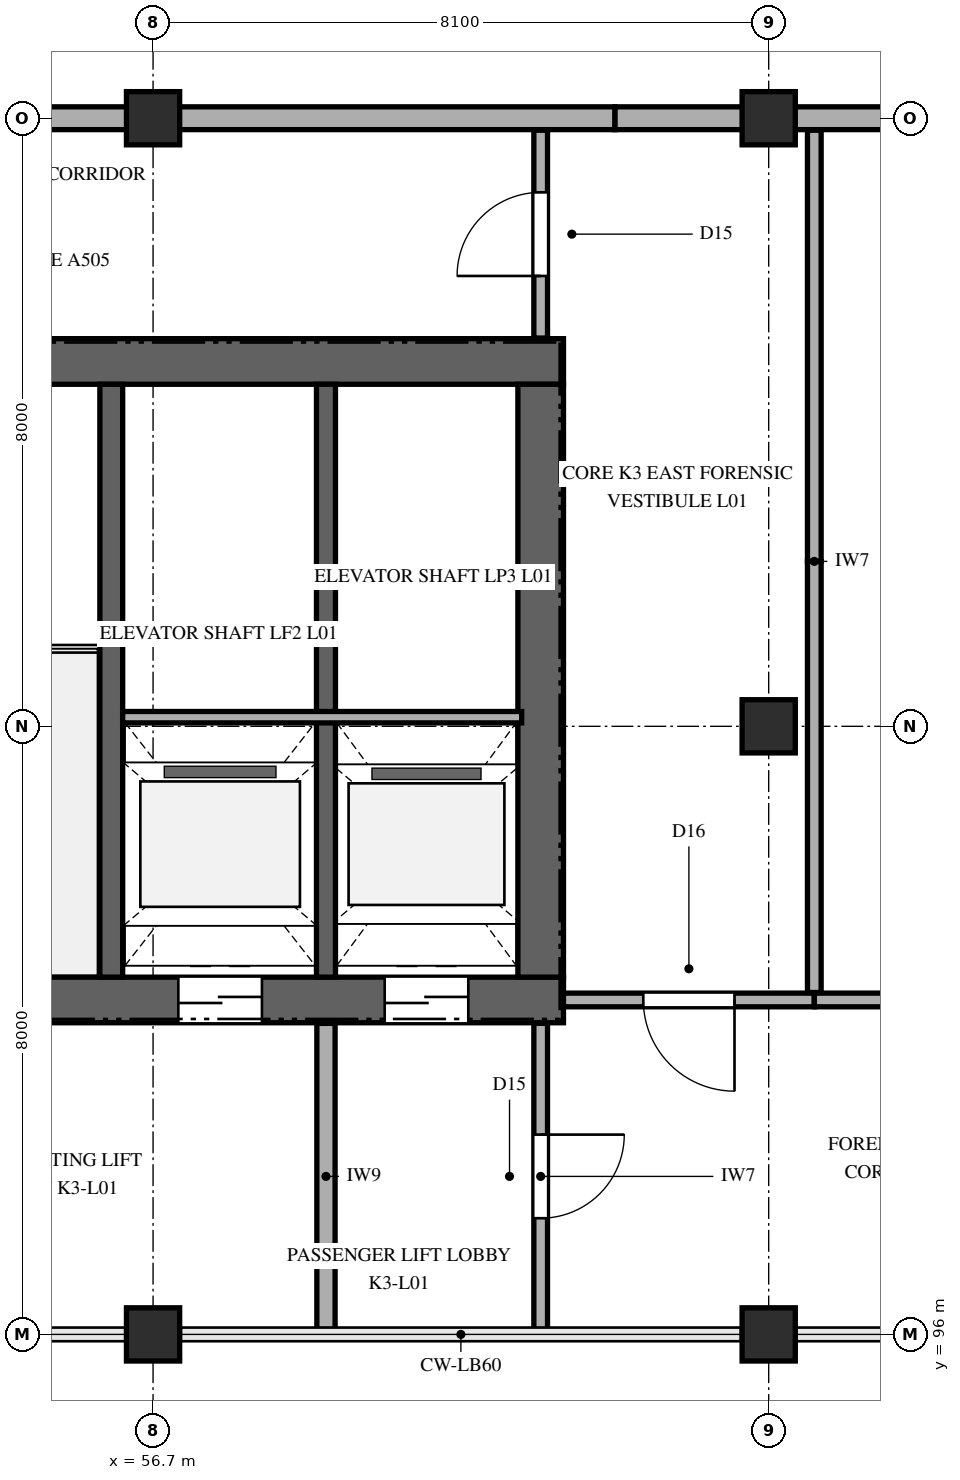
"""IFC4 building model, lengths in metres.
Left out: names, types, materials, properties, quantities, classifications, styles, units other than length and angle.
Written with IfcOpenShell. Run it as: python <this file> out.ifc"""

import sys

from ifc_helpers import new_model, si_unit, direction, frame, frame_2d, origin, origin_2d, place, context, subcontext, project, spatial, rectangle, extrude, element, fill, save


model = new_model("IFC4")
c1 = context("Model", 3, precision=1e-05, world=origin(), true_north=direction((0.0, 1.0)))
c2 = subcontext(c1, "Body", "Model", "MODEL_VIEW")
j1 = project(units=[si_unit("LENGTHUNIT", "METRE"), si_unit("PLANEANGLEUNIT", "RADIAN")], contexts=[c1])
p1 = place(None, origin())
s1 = spatial("IfcSite", under=j1, at=p1, CompositionType="ELEMENT")
p2 = place(p1, origin())
s2 = spatial("IfcBuilding", under=s1, at=p2, CompositionType="ELEMENT")
p3 = place(p2, frame((0.0, 0.0, 5.4)))
s3 = spatial("IfcBuildingStorey", under=s2, at=p3, CompositionType="ELEMENT", Elevation=5.4)
p4 = place(p3, frame((46.7, 100.4, 0.0), z_axis=(0.0, 0.0, 1.0), x_axis=(1.0, 0.0, 0.0)))
e1 = element("IfcWall", 1, at=p4, inside=s3, PredefinedType="SHEAR", context=c2, shape_type="SweptSolid", body=[
    extrude(rectangle(XDim=15.4, YDim=0.6, at=frame_2d((7.7, 0.0))), origin(), (0.0, 0.0, 1.0), 4.8),
])
p5 = place(p4, frame((1.05, 0.0, 0.0)))
e2 = element("IfcOpeningElement", 2, at=p5, cuts=e1, PredefinedType="OPENING", context=c2, shape_type="SweptSolid", body=[
    extrude(rectangle(XDim=1.15, YDim=2.25, at=frame_2d((0.575, 1.125))), frame((0.0, 0.31, 0.0), z_axis=(0.0, -1.0, 0.0), x_axis=(1.0, 0.0, 0.0)), (0.0, 0.0, 1.0), 0.62),
])
p6 = place(p4, frame((10.333, 0.0, 0.0)))
e3 = element("IfcOpeningElement", 3, at=p6, cuts=e1, PredefinedType="OPENING", context=c2, shape_type="SweptSolid", body=[
    extrude(rectangle(XDim=1.1, YDim=2.2, at=frame_2d((0.55, 1.1))), frame((0.0, 0.31, 0.0), z_axis=(0.0, -1.0, 0.0), x_axis=(1.0, 0.0, 0.0)), (0.0, 0.0, 1.0), 0.62),
])
p7 = place(p4, frame((13.048, 0.0, 0.0)))
e4 = element("IfcOpeningElement", 4, at=p7, cuts=e1, PredefinedType="OPENING", context=c2, shape_type="SweptSolid", body=[
    extrude(rectangle(XDim=1.1, YDim=2.2, at=frame_2d((0.55, 1.1))), frame((0.0, 0.31, 0.0), z_axis=(0.0, -1.0, 0.0), x_axis=(1.0, 0.0, 0.0)), (0.0, 0.0, 1.0), 0.62),
])
p8 = place(p3, frame((46.7, 108.8, 0.0), z_axis=(0.0, 0.0, 1.0), x_axis=(1.0, 0.0, 0.0)))
e5 = element("IfcWall", 5, at=p8, inside=s3, PredefinedType="SHEAR", context=c2, shape_type="SweptSolid", body=[
    extrude(rectangle(XDim=15.4, YDim=0.6, at=frame_2d((7.7, 0.0))), origin(), (0.0, 0.0, 1.0), 4.8),
])
p9 = place(p3, frame((61.8, 100.7, 0.0), z_axis=(0.0, 0.0, 1.0), x_axis=(0.0, 1.0, 0.0)))
e6 = element("IfcWall", 6, at=p9, inside=s3, PredefinedType="SHEAR", context=c2, shape_type="SweptSolid", body=[
    extrude(rectangle(XDim=7.8, YDim=0.6, at=frame_2d((3.9, 0.0))), origin(), (0.0, 0.0, 1.0), 4.8),
])
p10 = place(p3, frame((56.15, 100.7, 0.0), z_axis=(0.0, 0.0, 1.0), x_axis=(0.0, 1.0, 0.0)))
e7 = element("IfcWall", 7, at=p10, inside=s3, PredefinedType="SHEAR", context=c2, shape_type="SweptSolid", body=[
    extrude(rectangle(XDim=7.8, YDim=0.3, at=frame_2d((3.9, 0.0))), origin(), (0.0, 0.0, 1.0), 4.8),
])
p11 = place(p3, frame((58.975, 100.7, 0.0), z_axis=(0.0, 0.0, 1.0), x_axis=(0.0, 1.0, 0.0)))
e8 = element("IfcWall", 8, at=p11, inside=s3, PredefinedType="SHEAR", context=c2, shape_type="SweptSolid", body=[
    extrude(rectangle(XDim=7.8, YDim=0.25, at=frame_2d((3.9, 0.0))), origin(), (0.0, 0.0, 1.0), 4.8),
])
for number, where, z_axis, x_axis in (
    (9, (56.7, 96.0, 0.0), (0.0, 0.0, 1.0), (1.0, 0.0, 0.0)),
    (10, (56.7, 112.0, 0.0), (0.0, 0.0, 1.0), (1.0, 0.0, 0.0)),
    (11, (64.8, 96.0, 0.0), (0.0, 0.0, 1.0), (1.0, 0.0, 0.0)),
    (12, (64.8, 104.0, 0.0), (0.0, 0.0, 1.0), (1.0, 0.0, 0.0)),
    (13, (64.8, 112.0, 0.0), (0.0, 0.0, 1.0), (1.0, 0.0, 0.0)),
):
    element("IfcColumn", number, at=place(p3, frame(where, z_axis=z_axis, x_axis=x_axis)), inside=s3, PredefinedType="COLUMN", context=c2, shape_type="SweptSolid", body=[
        extrude(rectangle(XDim=0.7, YDim=0.7, at=origin_2d()), origin(), (0.0, 0.0, 1.0), 4.8),
    ])
p12 = place(p3, frame((76.95, 112.0, 0.0), z_axis=(0.0, 0.0, 1.0), x_axis=(-1.0, 0.0, 0.0)))
e14 = element("IfcWall", 14, at=p12, inside=s3, PredefinedType="SOLIDWALL", context=c2, shape_type="SweptSolid", body=[
    extrude(rectangle(XDim=14.175, YDim=0.3, at=frame_2d((7.087, 0.0))), origin(), (0.0, 0.0, 1.0), 3.812),
])
p13 = place(p12, frame((5.4, 0.0, 0.95)))
e15 = element("IfcOpeningElement", 15, at=p13, cuts=e14, PredefinedType="OPENING", context=c2, shape_type="SweptSolid", body=[
    extrude(rectangle(XDim=3.6, YDim=0.9, at=frame_2d((1.8, 0.45))), frame((0.0, 0.16, 0.0), z_axis=(0.0, -1.0, 0.0), x_axis=(1.0, 0.0, 0.0)), (0.0, 0.0, 1.0), 0.32),
])
p14 = place(p3, frame((62.775, 112.0, 0.0), z_axis=(0.0, 0.0, 1.0), x_axis=(-1.0, 0.0, 0.0)))
e16 = element("IfcWall", 16, at=p14, inside=s3, PredefinedType="SOLIDWALL", context=c2, shape_type="SweptSolid", body=[
    extrude(rectangle(XDim=14.175, YDim=0.3, at=frame_2d((7.087, 0.0))), origin(), (0.0, 0.0, 1.0), 3.812),
])
p15 = place(p14, frame((8.55, 0.0, 0.95)))
e17 = element("IfcOpeningElement", 17, at=p15, cuts=e16, PredefinedType="OPENING", context=c2, shape_type="SweptSolid", body=[
    extrude(rectangle(XDim=1.6, YDim=1.4, at=frame_2d((0.8, 0.7))), frame((0.0, 0.16, 0.0), z_axis=(0.0, -1.0, 0.0), x_axis=(1.0, 0.0, 0.0)), (0.0, 0.0, 1.0), 0.32),
])
p16 = place(p3, frame((56.3, 104.12, 0.0), z_axis=(0.0, 0.0, 1.0), x_axis=(1.0, 0.0, 0.0)))
e18 = element("IfcWall", 18, at=p16, inside=s3, PredefinedType="PARTITIONING", context=c2, shape_type="SweptSolid", body=[
    extrude(rectangle(XDim=5.25, YDim=0.15, at=frame_2d((2.625, 0.0))), origin(), (0.0, 0.0, 1.0), 4.52),
])
p17 = place(p3, frame((62.1, 100.4, 0.0), z_axis=(0.0, 0.0, 1.0), x_axis=(1.0, 0.0, 0.0)))
e19 = element("IfcWall", 19, at=p17, inside=s3, PredefinedType="PARTITIONING", context=c2, shape_type="SweptSolid", body=[
    extrude(rectangle(XDim=3.3, YDim=0.18, at=frame_2d((1.65, 0.0))), origin(), (0.0, 0.0, 1.0), 4.52),
])
p18 = place(p17, frame((1.05, 0.0, 0.0)))
e20 = element("IfcOpeningElement", 20, at=p18, cuts=e19, PredefinedType="OPENING", context=c2, shape_type="SweptSolid", body=[
    extrude(rectangle(XDim=1.2, YDim=2.2, at=frame_2d((0.6, 1.1))), frame((0.0, 0.1, 0.0), z_axis=(0.0, -1.0, 0.0), x_axis=(1.0, 0.0, 0.0)), (0.0, 0.0, 1.0), 0.2),
])
p19 = place(p3, frame((65.4, 100.4, 0.0), z_axis=(0.0, 0.0, 1.0), x_axis=(1.0, 0.0, 0.0)))
e21 = element("IfcWall", 21, at=p19, inside=s3, PredefinedType="PARTITIONING", context=c2, shape_type="SweptSolid", body=[
    extrude(rectangle(XDim=19.1, YDim=0.18, at=frame_2d((9.55, 0.0))), origin(), (0.0, 0.0, 1.0), 4.52),
])
p20 = place(p19, frame((9.0, 0.0, 0.0)))
e22 = element("IfcOpeningElement", 22, at=p20, cuts=e21, PredefinedType="OPENING", context=c2, shape_type="SweptSolid", body=[
    extrude(rectangle(XDim=1.1, YDim=2.3, at=frame_2d((0.55, 1.15))), frame((0.0, 0.1, 0.0), z_axis=(0.0, -1.0, 0.0), x_axis=(1.0, 0.0, 0.0)), (0.0, 0.0, 1.0), 0.2),
])
p21 = place(p3, frame((58.975, 96.065, 0.0), z_axis=(0.0, 0.0, 1.0), x_axis=(0.0, 1.0, 0.0)))
e23 = element("IfcWall", 23, at=p21, inside=s3, PredefinedType="PARTITIONING", context=c2, shape_type="SweptSolid", body=[
    extrude(rectangle(XDim=4.027, YDim=0.24, at=frame_2d((2.014, 0.0))), origin(), (0.0, 0.0, 1.0), 4.52),
])
p22 = place(p3, frame((61.8, 96.065, 0.0), z_axis=(0.0, 0.0, 1.0), x_axis=(0.0, 1.0, 0.0)))
e24 = element("IfcWall", 24, at=p22, inside=s3, PredefinedType="PARTITIONING", context=c2, shape_type="SweptSolid", body=[
    extrude(rectangle(XDim=4.027, YDim=0.18, at=frame_2d((2.014, 0.0))), origin(), (0.0, 0.0, 1.0), 4.52),
])
p23 = place(p22, frame((1.463, 0.0, 0.0)))
e25 = element("IfcOpeningElement", 25, at=p23, cuts=e24, PredefinedType="OPENING", context=c2, shape_type="SweptSolid", body=[
    extrude(rectangle(XDim=1.1, YDim=2.2, at=frame_2d((0.55, 1.1))), frame((0.0, 0.1, 0.0), z_axis=(0.0, -1.0, 0.0), x_axis=(1.0, 0.0, 0.0)), (0.0, 0.0, 1.0), 0.2),
])
p24 = place(p3, frame((61.8, 109.108, 0.0), z_axis=(0.0, 0.0, 1.0), x_axis=(0.0, 1.0, 0.0)))
e26 = element("IfcWall", 26, at=p24, inside=s3, PredefinedType="PARTITIONING", context=c2, shape_type="SweptSolid", body=[
    extrude(rectangle(XDim=2.734, YDim=0.18, at=frame_2d((1.367, 0.0))), origin(), (0.0, 0.0, 1.0), 4.52),
])
p25 = place(p24, frame((0.817, 0.0, 0.0)))
e27 = element("IfcOpeningElement", 27, at=p25, cuts=e26, PredefinedType="OPENING", context=c2, shape_type="SweptSolid", body=[
    extrude(rectangle(XDim=1.1, YDim=2.2, at=frame_2d((0.55, 1.1))), frame((0.0, 0.1, 0.0), z_axis=(0.0, -1.0, 0.0), x_axis=(1.0, 0.0, 0.0)), (0.0, 0.0, 1.0), 0.2),
])
p26 = place(p3, frame((65.4, 100.498, 0.0), z_axis=(0.0, 0.0, 1.0), x_axis=(0.0, 1.0, 0.0)))
e28 = element("IfcWall", 28, at=p26, inside=s3, PredefinedType="PARTITIONING", context=c2, shape_type="SweptSolid", body=[
    extrude(rectangle(XDim=5.672, YDim=0.18, at=frame_2d((2.836, 0.0))), origin(), (0.0, 0.0, 1.0), 4.52),
])
p27 = place(p3, frame((65.4, 106.17, 0.0), z_axis=(0.0, 0.0, 1.0), x_axis=(0.0, 1.0, 0.0)))
e29 = element("IfcWall", 29, at=p27, inside=s3, PredefinedType="PARTITIONING", context=c2, shape_type="SweptSolid", body=[
    extrude(rectangle(XDim=5.672, YDim=0.18, at=frame_2d((2.836, 0.0))), origin(), (0.0, 0.0, 1.0), 4.52),
])
p28 = place(p6, frame((1.1, 0.0, 0.0), z_axis=(0.0, 0.0, 1.0), x_axis=(-1.0, 0.0, 0.0)))
e30 = element("IfcDoor", 30, at=p28, inside=s3, OperationType="DOUBLE_DOOR_SLIDING", PredefinedType="DOOR", context=c2, shape_type="SweptSolid", body=[
    extrude(rectangle(XDim=1.1, YDim=2.2, at=frame_2d((0.55, 1.1))), frame((0.0, 0.025, 0.0), z_axis=(0.0, -1.0, 0.0), x_axis=(1.0, 0.0, 0.0)), (0.0, 0.0, 1.0), 0.05),
])
fill(e3, e30)
p29 = place(p7, frame((1.1, 0.0, 0.0), z_axis=(0.0, 0.0, 1.0), x_axis=(-1.0, 0.0, 0.0)))
e31 = element("IfcDoor", 31, at=p29, inside=s3, OperationType="DOUBLE_DOOR_SLIDING", PredefinedType="DOOR", context=c2, shape_type="SweptSolid", body=[
    extrude(rectangle(XDim=1.1, YDim=2.2, at=frame_2d((0.55, 1.1))), frame((0.0, 0.025, 0.0), z_axis=(0.0, -1.0, 0.0), x_axis=(1.0, 0.0, 0.0)), (0.0, 0.0, 1.0), 0.05),
])
fill(e4, e31)
p30 = place(p18, frame((1.2, 0.0, 0.0), z_axis=(0.0, 0.0, 1.0), x_axis=(-1.0, 0.0, 0.0)))
e32 = element("IfcDoor", 32, at=p30, inside=s3, OperationType="SINGLE_SWING_RIGHT", PredefinedType="DOOR", context=c2, shape_type="SweptSolid", body=[
    extrude(rectangle(XDim=1.2, YDim=2.2, at=frame_2d((0.6, 1.1))), frame((0.0, 0.025, 0.0), z_axis=(0.0, -1.0, 0.0), x_axis=(1.0, 0.0, 0.0)), (0.0, 0.0, 1.0), 0.05),
])
fill(e20, e32)
p31 = place(p23, frame((1.1, 0.0, 0.0), z_axis=(0.0, 0.0, 1.0), x_axis=(-1.0, 0.0, 0.0)))
e33 = element("IfcDoor", 33, at=p31, inside=s3, OperationType="SINGLE_SWING_RIGHT", PredefinedType="DOOR", context=c2, shape_type="SweptSolid", body=[
    extrude(rectangle(XDim=1.1, YDim=2.2, at=frame_2d((0.55, 1.1))), frame((0.0, 0.025, 0.0), z_axis=(0.0, -1.0, 0.0), x_axis=(1.0, 0.0, 0.0)), (0.0, 0.0, 1.0), 0.05),
])
fill(e25, e33)
p32 = place(p25, origin())
e34 = element("IfcDoor", 34, at=p32, inside=s3, OperationType="SINGLE_SWING_LEFT", PredefinedType="DOOR", context=c2, shape_type="SweptSolid", body=[
    extrude(rectangle(XDim=1.1, YDim=2.2, at=frame_2d((0.55, 1.1))), frame((0.0, 0.025, 0.0), z_axis=(0.0, -1.0, 0.0), x_axis=(1.0, 0.0, 0.0)), (0.0, 0.0, 1.0), 0.05),
])
fill(e27, e34)
save(model, sys.argv[1])
